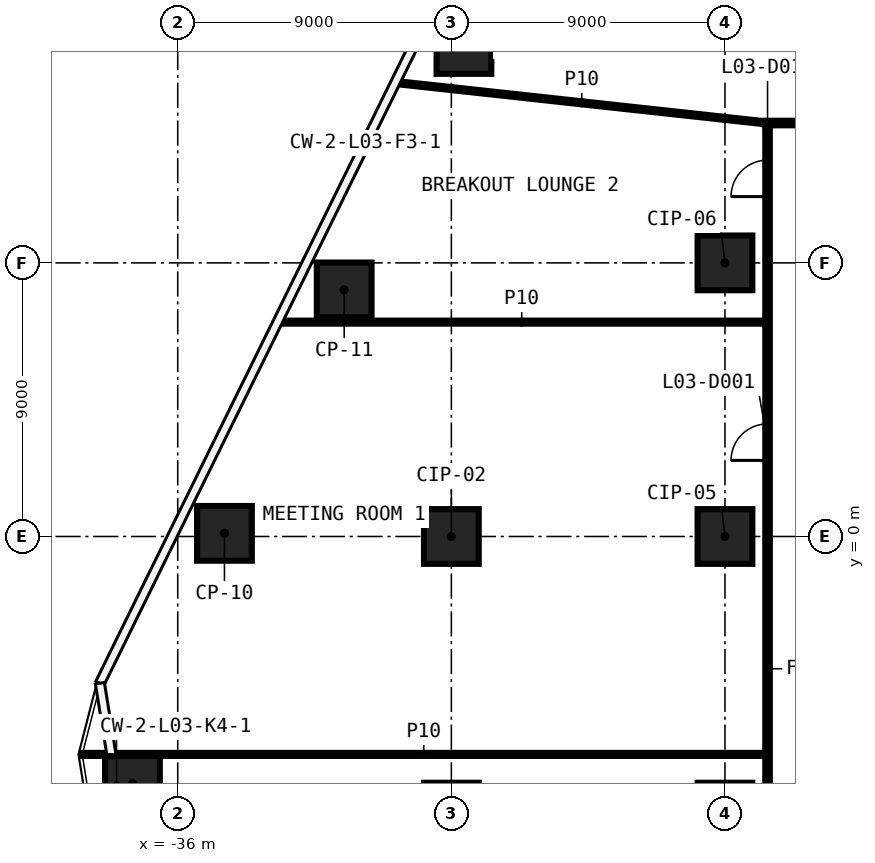
"""IFC4 building model, lengths in metres.
Left out: names, types, materials, properties, quantities, classifications, styles, units other than length and angle.
Written with IfcOpenShell. Run it as: python <this file> out.ifc"""

import sys

from ifc_helpers import new_model, si_unit, direction, frame, frame_2d, origin, origin_2d, place, context, subcontext, project, spatial, rectangle, extrude, element, fill, save


model = new_model("IFC4")
c1 = context("Model", 3, precision=1e-05, world=origin(), true_north=direction((0.0, 1.0)))
c2 = subcontext(c1, "Body", "Model", "MODEL_VIEW")
j1 = project(units=[si_unit("LENGTHUNIT", "METRE"), si_unit("PLANEANGLEUNIT", "RADIAN")], contexts=[c1])
p1 = place(None, origin())
s1 = spatial("IfcSite", under=j1, at=p1, CompositionType="ELEMENT")
p2 = place(p1, origin())
s2 = spatial("IfcBuilding", under=s1, at=p2, CompositionType="ELEMENT")
p3 = place(p2, frame((0.0, 0.0, 27.0)))
s3 = spatial("IfcBuildingStorey", under=s2, at=p3, CompositionType="ELEMENT", Elevation=27.0)
for number, where, z_axis, x_axis in (
    (1, (-37.489, -8.123, 0.0), (0.0, 0.0, 1.0), (1.0, 0.0, 0.0)),
    (2, (-34.463, 0.103, 0.0), (0.0, 0.0, 1.0), (1.0, 0.0, 0.0)),
    (3, (-30.525, 8.111, 0.0), (0.0, 0.0, 1.0), (1.0, 0.0, 0.0)),
    (4, (-26.586, 16.118, 0.0), (0.0, 0.0, 1.0), (1.0, 0.0, 0.0)),
    (5, (-27.0, -9.0, 0.0), (0.0, 0.0, 1.0), (1.0, 0.0, 0.0)),
    (6, (-27.0, 0.0, 0.0), (0.0, 0.0, 1.0), (1.0, 0.0, 0.0)),
    (7, (-18.0, -9.0, 0.0), (0.0, 0.0, 1.0), (1.0, 0.0, 0.0)),
    (8, (-18.0, 0.0, 0.0), (0.0, 0.0, 1.0), (1.0, 0.0, 0.0)),
    (9, (-18.0, 9.0, 0.0), (0.0, 0.0, 1.0), (1.0, 0.0, 0.0)),
):
    element("IfcColumn", number, at=place(p3, frame(where, z_axis=z_axis, x_axis=x_axis)), inside=s3, PredefinedType="COLUMN", context=c2, shape_type="SweptSolid", body=[
        extrude(rectangle(XDim=1.8, YDim=1.8, at=origin_2d()), origin(), (0.0, 0.0, 1.0), 5.55),
    ])
p4 = place(p3, frame((-39.14, -7.168, 0.0), z_axis=(0.0, 0.0, 1.0), x_axis=(1.0, 0.0, 0.0)))
e10 = element("IfcWall", 10, at=p4, inside=s3, PredefinedType="PARTITIONING", context=c2, shape_type="SweptSolid", body=[
    extrude(rectangle(XDim=22.465, YDim=0.1, at=frame_2d((11.232, 0.0))), origin(), (0.0, 0.0, 1.0), 5.55),
])
p5 = place(p3, frame((-32.695, 7.051, 0.0), z_axis=(0.0, 0.0, 1.0), x_axis=(1.0, 0.0, 0.0)))
e11 = element("IfcWall", 11, at=p5, inside=s3, PredefinedType="PARTITIONING", context=c2, shape_type="SweptSolid", body=[
    extrude(rectangle(XDim=16.02, YDim=0.1, at=frame_2d((8.01, 0.0))), origin(), (0.0, 0.0, 1.0), 5.55),
])
p6 = place(p3, frame((-16.675, 13.6, 0.0), z_axis=(0.0, 0.0, 1.0), x_axis=(1.0, 0.0, 0.0)))
e12 = element("IfcWall", 12, at=p6, inside=s3, PredefinedType="PARTITIONING", context=c2, shape_type="SweptSolid", body=[
    extrude(rectangle(XDim=33.35, YDim=0.15, at=frame_2d((16.675, 0.0))), origin(), (0.0, 0.0, 1.0), 5.55),
])
p7 = place(p6, frame((27.447, 0.0, 0.0)))
e13 = element("IfcOpeningElement", 13, at=p7, cuts=e12, PredefinedType="OPENING", context=c2, shape_type="SweptSolid", body=[
    extrude(rectangle(XDim=1.2, YDim=2.1, at=frame_2d((0.6, 1.05))), frame((0.0, 0.085, 0.0), z_axis=(0.0, -1.0, 0.0), x_axis=(1.0, 0.0, 0.0)), (0.0, 0.0, 1.0), 0.17),
])
p8 = place(p6, frame((19.346, 0.0, 0.0)))
e14 = element("IfcOpeningElement", 14, at=p8, cuts=e12, PredefinedType="OPENING", context=c2, shape_type="SweptSolid", body=[
    extrude(rectangle(XDim=1.2, YDim=2.1, at=frame_2d((0.6, 1.05))), frame((0.0, 0.085, 0.0), z_axis=(0.0, -1.0, 0.0), x_axis=(1.0, 0.0, 0.0)), (0.0, 0.0, 1.0), 0.17),
])
p9 = place(p3, frame((-16.6, -13.525, 0.0), z_axis=(0.0, 0.0, 1.0), x_axis=(0.0, 1.0, 0.0)))
e15 = element("IfcWall", 15, at=p9, inside=s3, PredefinedType="PARTITIONING", context=c2, shape_type="SweptSolid", body=[
    extrude(rectangle(XDim=27.05, YDim=0.15, at=frame_2d((13.525, 0.0))), origin(), (0.0, 0.0, 1.0), 5.55),
])
p10 = place(p9, frame((16.028, 0.0, 0.0)))
e16 = element("IfcOpeningElement", 16, at=p10, cuts=e15, PredefinedType="OPENING", context=c2, shape_type="SweptSolid", body=[
    extrude(rectangle(XDim=1.2, YDim=2.1, at=frame_2d((0.6, 1.05))), frame((0.0, 0.085, 0.0), z_axis=(0.0, -1.0, 0.0), x_axis=(1.0, 0.0, 0.0)), (0.0, 0.0, 1.0), 0.17),
])
p11 = place(p9, frame((1.121, 0.0, 0.0)))
e17 = element("IfcOpeningElement", 17, at=p11, cuts=e15, PredefinedType="OPENING", context=c2, shape_type="SweptSolid", body=[
    extrude(rectangle(XDim=1.2, YDim=2.1, at=frame_2d((0.6, 1.05))), frame((0.0, 0.085, 0.0), z_axis=(0.0, -1.0, 0.0), x_axis=(1.0, 0.0, 0.0)), (0.0, 0.0, 1.0), 0.17),
])
p12 = place(p9, frame((24.705, 0.0, 0.0)))
e18 = element("IfcOpeningElement", 18, at=p12, cuts=e15, PredefinedType="OPENING", context=c2, shape_type="SweptSolid", body=[
    extrude(rectangle(XDim=1.2, YDim=2.1, at=frame_2d((0.6, 1.05))), frame((0.0, 0.085, 0.0), z_axis=(0.0, -1.0, 0.0), x_axis=(1.0, 0.0, 0.0)), (0.0, 0.0, 1.0), 0.17),
])
p13 = place(p3, frame((-28.819, 14.931, 0.0), z_axis=(0.0, 0.0, 1.0), x_axis=(0.994112645196, -0.108351505116, 0.0)))
e19 = element("IfcWall", 19, at=p13, inside=s3, PredefinedType="PARTITIONING", context=c2, shape_type="SweptSolid", body=[
    extrude(rectangle(XDim=12.291, YDim=0.1, at=frame_2d((6.146, 0.0))), origin(), (0.0, 0.0, 1.0), 5.55),
])
p14 = place(p10, origin())
e20 = element("IfcDoor", 20, at=p14, inside=s3, OperationType="SINGLE_SWING_RIGHT", PredefinedType="DOOR", context=c2, shape_type="SweptSolid", body=[
    extrude(rectangle(XDim=1.2, YDim=2.1, at=frame_2d((0.6, 1.05))), frame((0.0, 0.025, 0.0), z_axis=(0.0, -1.0, 0.0), x_axis=(1.0, 0.0, 0.0)), (0.0, 0.0, 1.0), 0.05),
])
fill(e16, e20)
p15 = place(p12, origin())
e21 = element("IfcDoor", 21, at=p15, inside=s3, OperationType="SINGLE_SWING_LEFT", PredefinedType="DOOR", context=c2, shape_type="SweptSolid", body=[
    extrude(rectangle(XDim=1.2, YDim=2.1, at=frame_2d((0.6, 1.05))), frame((0.0, 0.025, 0.0), z_axis=(0.0, -1.0, 0.0), x_axis=(1.0, 0.0, 0.0)), (0.0, 0.0, 1.0), 0.05),
])
fill(e18, e21)
save(model, sys.argv[1])
